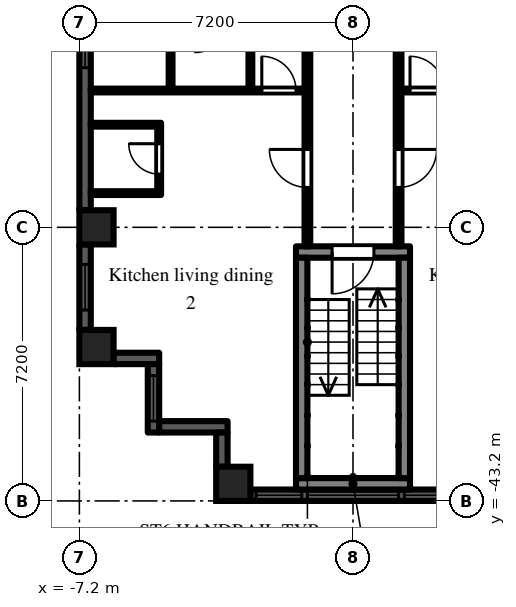
"""IFC4 building model, lengths in metres.
Left out: names, types, materials, properties, quantities, classifications, styles, units other than length and angle.
Written with IfcOpenShell. Run it as: python <this file> out.ifc"""

import sys

from ifc_helpers import new_model, si_unit, direction, frame, frame_2d, origin, origin_2d, place, context, subcontext, project, spatial, rectangle, extrude, element, fill, save


model = new_model("IFC4")
c1 = context("Model", 3, precision=1e-05, world=origin(), true_north=direction((0.0, 1.0)))
c2 = subcontext(c1, "Body", "Model", "MODEL_VIEW")
j1 = project(units=[si_unit("LENGTHUNIT", "METRE"), si_unit("PLANEANGLEUNIT", "RADIAN")], contexts=[c1])
p1 = place(None, origin())
s1 = spatial("IfcSite", under=j1, at=p1, CompositionType="ELEMENT")
p2 = place(p1, origin())
s2 = spatial("IfcBuilding", under=s1, at=p2, CompositionType="ELEMENT")
p3 = place(p2, frame((0.0, 0.0, 69.9)))
s3 = spatial("IfcBuildingStorey", under=s2, at=p3, CompositionType="ELEMENT", Elevation=69.9)
for number, where, z_axis, x_axis in (
    (1, (-6.75, -39.15, 0.0), (0.0, 0.0, 1.0), (1.0, 0.0, 0.0)),
    (2, (-6.75, -36.0, 0.0), (0.0, 0.0, 1.0), (1.0, 0.0, 0.0)),
    (3, (-3.15, -42.75, 0.0), (0.0, 0.0, 1.0), (1.0, 0.0, 0.0)),
):
    element("IfcColumn", number, at=place(p3, frame(where, z_axis=z_axis, x_axis=x_axis)), inside=s3, PredefinedType="COLUMN", context=c2, shape_type="SweptSolid", body=[
        extrude(rectangle(XDim=0.9, YDim=0.9, at=origin_2d()), origin(), (0.0, 0.0, 1.0), 3.0),
    ])
p4 = place(p3, frame((-7.05, -29.25, 0.0), z_axis=(0.0, 0.0, 1.0), x_axis=(0.0, -1.0, 0.0)))
e4 = element("IfcWall", 4, at=p4, inside=s3, PredefinedType="SOLIDWALL", context=c2, shape_type="SweptSolid", body=[
    extrude(rectangle(XDim=6.3, YDim=0.3, at=frame_2d((3.15, 0.0))), origin(), (0.0, 0.0, 1.0), 2.1),
])
p5 = place(p4, frame((0.15, 0.0, 0.2)))
e5 = element("IfcOpeningElement", 5, at=p5, cuts=e4, PredefinedType="OPENING", context=c2, shape_type="SweptSolid", body=[
    extrude(rectangle(XDim=2.4, YDim=1.85, at=frame_2d((1.2, 0.925))), frame((0.0, 0.16, 0.0), z_axis=(0.0, -1.0, 0.0), x_axis=(1.0, 0.0, 0.0)), (0.0, 0.0, 1.0), 0.32),
])
p6 = place(p3, frame((-7.05, -36.45, 0.0), z_axis=(0.0, 0.0, 1.0), x_axis=(0.0, -1.0, 0.0)))
e6 = element("IfcWall", 6, at=p6, inside=s3, PredefinedType="SOLIDWALL", context=c2, shape_type="SweptSolid", body=[
    extrude(rectangle(XDim=2.25, YDim=0.3, at=frame_2d((1.125, 0.0))), origin(), (0.0, 0.0, 1.0), 2.1),
])
p7 = place(p6, frame((0.525, 0.0, 0.2)))
e7 = element("IfcOpeningElement", 7, at=p7, cuts=e6, PredefinedType="OPENING", context=c2, shape_type="SweptSolid", body=[
    extrude(rectangle(XDim=1.2, YDim=1.85, at=frame_2d((0.6, 0.925))), frame((0.0, 0.16, 0.0), z_axis=(0.0, -1.0, 0.0), x_axis=(1.0, 0.0, 0.0)), (0.0, 0.0, 1.0), 0.32),
])
p8 = place(p3, frame((-6.3, -39.45, 0.0), z_axis=(0.0, 0.0, 1.0), x_axis=(1.0, 0.0, 0.0)))
e8 = element("IfcWall", 8, at=p8, inside=s3, PredefinedType="SOLIDWALL", context=c2, shape_type="SweptSolid", body=[
    extrude(rectangle(XDim=1.2, YDim=0.3, at=frame_2d((0.6, 0.0))), origin(), (0.0, 0.0, 1.0), 2.575),
])
p9 = place(p3, frame((-5.25, -39.6, 0.0), z_axis=(0.0, 0.0, 1.0), x_axis=(0.0, -1.0, 0.0)))
e9 = element("IfcWall", 9, at=p9, inside=s3, PredefinedType="SOLIDWALL", context=c2, shape_type="SweptSolid", body=[
    extrude(rectangle(XDim=1.8, YDim=0.3, at=frame_2d((0.9, 0.0))), origin(), (0.0, 0.0, 1.0), 2.575),
])
p10 = place(p9, frame((0.3, 0.0, 0.2)))
e10 = element("IfcOpeningElement", 10, at=p10, cuts=e9, PredefinedType="OPENING", context=c2, shape_type="SweptSolid", body=[
    extrude(rectangle(XDim=1.2, YDim=1.85, at=frame_2d((0.6, 0.925))), frame((0.0, 0.16, 0.0), z_axis=(0.0, -1.0, 0.0), x_axis=(1.0, 0.0, 0.0)), (0.0, 0.0, 1.0), 0.32),
])
p11 = place(p3, frame((-5.1, -41.25, 0.0), z_axis=(0.0, 0.0, 1.0), x_axis=(1.0, 0.0, 0.0)))
e11 = element("IfcWall", 11, at=p11, inside=s3, PredefinedType="SOLIDWALL", context=c2, shape_type="SweptSolid", body=[
    extrude(rectangle(XDim=1.8, YDim=0.3, at=frame_2d((0.9, 0.0))), origin(), (0.0, 0.0, 1.0), 2.575),
])
p12 = place(p3, frame((-3.45, -41.4, 0.0), z_axis=(0.0, 0.0, 1.0), x_axis=(0.0, -1.0, 0.0)))
e12 = element("IfcWall", 12, at=p12, inside=s3, PredefinedType="SOLIDWALL", context=c2, shape_type="SweptSolid", body=[
    extrude(rectangle(XDim=0.9, YDim=0.3, at=frame_2d((0.45, 0.0))), origin(), (0.0, 0.0, 1.0), 2.575),
])
p13 = place(p3, frame((-2.7, -43.05, 0.0), z_axis=(0.0, 0.0, 1.0), x_axis=(1.0, 0.0, 0.0)))
e13 = element("IfcWall", 13, at=p13, inside=s3, PredefinedType="SOLIDWALL", context=c2, shape_type="SweptSolid", body=[
    extrude(rectangle(XDim=5.4, YDim=0.3, at=frame_2d((2.7, 0.0))), origin(), (0.0, 0.0, 1.0), 2.1),
])
p14 = place(p13, frame((1.5, 0.0, 0.2)))
e14 = element("IfcOpeningElement", 14, at=p14, cuts=e13, PredefinedType="OPENING", context=c2, shape_type="SweptSolid", body=[
    extrude(rectangle(XDim=2.4, YDim=1.85, at=frame_2d((1.2, 0.925))), frame((0.0, 0.16, 0.0), z_axis=(0.0, -1.0, 0.0), x_axis=(1.0, 0.0, 0.0)), (0.0, 0.0, 1.0), 0.32),
])
p15 = place(p13, frame((0.15, 0.0, 0.2)))
e15 = element("IfcOpeningElement", 15, at=p15, cuts=e13, PredefinedType="OPENING", context=c2, shape_type="SweptSolid", body=[
    extrude(rectangle(XDim=1.2, YDim=1.85, at=frame_2d((0.6, 0.925))), frame((0.0, 0.16, 0.0), z_axis=(0.0, -1.0, 0.0), x_axis=(1.0, 0.0, 0.0)), (0.0, 0.0, 1.0), 0.32),
])
p16 = place(p13, frame((4.05, 0.0, 0.2)))
e16 = element("IfcOpeningElement", 16, at=p16, cuts=e13, PredefinedType="OPENING", context=c2, shape_type="SweptSolid", body=[
    extrude(rectangle(XDim=1.2, YDim=1.85, at=frame_2d((0.6, 0.925))), frame((0.0, 0.16, 0.0), z_axis=(0.0, -1.0, 0.0), x_axis=(1.0, 0.0, 0.0)), (0.0, 0.0, 1.0), 0.32),
])
p17 = place(p3, frame((-1.5, -36.65, 0.0), z_axis=(0.0, 0.0, 1.0), x_axis=(1.0, 0.0, 0.0)))
e17 = element("IfcWall", 17, at=p17, inside=s3, PredefinedType="SHEAR", context=c2, shape_type="SweptSolid", body=[
    extrude(rectangle(XDim=3.0, YDim=0.3, at=frame_2d((1.5, 0.0))), origin(), (0.0, 0.0, 1.0), 2.575),
])
p18 = place(p17, frame((0.95, 0.0, 0.0)))
e18 = element("IfcOpeningElement", 18, at=p18, cuts=e17, PredefinedType="OPENING", context=c2, shape_type="SweptSolid", body=[
    extrude(rectangle(XDim=1.1, YDim=2.1, at=frame_2d((0.55, 1.05))), frame((0.0, 0.16, 0.0), z_axis=(0.0, -1.0, 0.0), x_axis=(1.0, 0.0, 0.0)), (0.0, 0.0, 1.0), 0.32),
])
p19 = place(p3, frame((-1.5, -42.75, 0.0), z_axis=(0.0, 0.0, 1.0), x_axis=(1.0, 0.0, 0.0)))
e19 = element("IfcWall", 19, at=p19, inside=s3, PredefinedType="SHEAR", context=c2, shape_type="SweptSolid", body=[
    extrude(rectangle(XDim=3.0, YDim=0.3, at=frame_2d((1.5, 0.0))), origin(), (0.0, 0.0, 1.0), 2.575),
])
for number, where, z_axis, x_axis in (
    (20, (-1.35, -36.8, 0.0), (0.0, 0.0, 1.0), (0.0, -1.0, 0.0)),
    (21, (1.35, -36.8, 0.0), (0.0, 0.0, 1.0), (0.0, -1.0, 0.0)),
):
    element("IfcWall", number, at=place(p3, frame(where, z_axis=z_axis, x_axis=x_axis)), inside=s3, PredefinedType="SHEAR", context=c2, shape_type="SweptSolid", body=[
        extrude(rectangle(XDim=5.8, YDim=0.3, at=frame_2d((2.9, 0.0))), origin(), (0.0, 0.0, 1.0), 2.575),
    ])
for number, where, z_axis, x_axis in (
    (22, (-6.9, -35.1, 0.0), (0.0, 0.0, 1.0), (1.0, 0.0, 0.0)),
    (23, (-6.9, -33.3, 0.0), (0.0, 0.0, 1.0), (1.0, 0.0, 0.0)),
):
    element("IfcWall", number, at=place(p3, frame(where, z_axis=z_axis, x_axis=x_axis)), inside=s3, PredefinedType="PARTITIONING", context=c2, shape_type="SweptSolid", body=[
        extrude(rectangle(XDim=1.85, YDim=0.1, at=frame_2d((0.925, 0.0))), origin(), (0.0, 0.0, 1.0), 2.575),
    ])
p20 = place(p3, frame((-6.9, -32.4, 0.0), z_axis=(0.0, 0.0, 1.0), x_axis=(1.0, 0.0, 0.0)))
e24 = element("IfcWall", 24, at=p20, inside=s3, PredefinedType="PARTITIONING", context=c2, shape_type="SweptSolid", body=[
    extrude(rectangle(XDim=5.625, YDim=0.1, at=frame_2d((2.812, 0.0))), origin(), (0.0, 0.0, 1.0), 2.575),
])
p21 = place(p20, frame((4.5, 0.0, 0.0)))
e25 = element("IfcOpeningElement", 25, at=p21, cuts=e24, PredefinedType="OPENING", context=c2, shape_type="SweptSolid", body=[
    extrude(rectangle(XDim=0.9, YDim=2.1, at=frame_2d((0.45, 1.05))), frame((0.0, 0.06, 0.0), z_axis=(0.0, -1.0, 0.0), x_axis=(1.0, 0.0, 0.0)), (0.0, 0.0, 1.0), 0.12),
])
p22 = place(p3, frame((-5.1, -35.05, 0.0), z_axis=(0.0, 0.0, 1.0), x_axis=(0.0, 1.0, 0.0)))
e26 = element("IfcWall", 26, at=p22, inside=s3, PredefinedType="PARTITIONING", context=c2, shape_type="SweptSolid", body=[
    extrude(rectangle(XDim=1.7, YDim=0.1, at=frame_2d((0.85, 0.0))), origin(), (0.0, 0.0, 1.0), 2.575),
])
p23 = place(p22, frame((0.45, 0.0, 0.0)))
e27 = element("IfcOpeningElement", 27, at=p23, cuts=e26, PredefinedType="OPENING", context=c2, shape_type="SweptSolid", body=[
    extrude(rectangle(XDim=0.8, YDim=2.1, at=frame_2d((0.4, 1.05))), frame((0.0, 0.06, 0.0), z_axis=(0.0, -1.0, 0.0), x_axis=(1.0, 0.0, 0.0)), (0.0, 0.0, 1.0), 0.12),
])
p24 = place(p3, frame((-4.8, -32.35, 0.0), z_axis=(0.0, 0.0, 1.0), x_axis=(0.0, 1.0, 0.0)))
e28 = element("IfcWall", 28, at=p24, inside=s3, PredefinedType="PARTITIONING", context=c2, shape_type="SweptSolid", body=[
    extrude(rectangle(XDim=1.8, YDim=0.1, at=frame_2d((0.9, 0.0))), origin(), (0.0, 0.0, 1.0), 2.575),
])
p25 = place(p3, frame((-2.7, -32.35, 0.0), z_axis=(0.0, 0.0, 1.0), x_axis=(0.0, 1.0, 0.0)))
e29 = element("IfcWall", 29, at=p25, inside=s3, PredefinedType="PARTITIONING", context=c2, shape_type="SweptSolid", body=[
    extrude(rectangle(XDim=17.888, YDim=0.1, at=frame_2d((8.944, 0.0))), origin(), (0.0, 0.0, 1.0), 2.575),
])
p26 = place(p25, frame((2.2, 0.0, 0.0)))
e30 = element("IfcOpeningElement", 30, at=p26, cuts=e29, PredefinedType="OPENING", context=c2, shape_type="SweptSolid", body=[
    extrude(rectangle(XDim=0.9, YDim=2.1, at=frame_2d((0.45, 1.05))), frame((0.0, 0.06, 0.0), z_axis=(0.0, -1.0, 0.0), x_axis=(1.0, 0.0, 0.0)), (0.0, 0.0, 1.0), 0.12),
])
p27 = place(p25, frame((4.0, 0.0, 0.0)))
e31 = element("IfcOpeningElement", 31, at=p27, cuts=e29, PredefinedType="OPENING", context=c2, shape_type="SweptSolid", body=[
    extrude(rectangle(XDim=0.9, YDim=2.1, at=frame_2d((0.45, 1.05))), frame((0.0, 0.06, 0.0), z_axis=(0.0, -1.0, 0.0), x_axis=(1.0, 0.0, 0.0)), (0.0, 0.0, 1.0), 0.12),
])
p28 = place(p25, frame((9.4, 0.0, 0.0)))
e32 = element("IfcOpeningElement", 32, at=p28, cuts=e29, PredefinedType="OPENING", context=c2, shape_type="SweptSolid", body=[
    extrude(rectangle(XDim=0.9, YDim=2.1, at=frame_2d((0.45, 1.05))), frame((0.0, 0.06, 0.0), z_axis=(0.0, -1.0, 0.0), x_axis=(1.0, 0.0, 0.0)), (0.0, 0.0, 1.0), 0.12),
])
p29 = place(p25, frame((11.2, 0.0, 0.0)))
e33 = element("IfcOpeningElement", 33, at=p29, cuts=e29, PredefinedType="OPENING", context=c2, shape_type="SweptSolid", body=[
    extrude(rectangle(XDim=0.9, YDim=2.1, at=frame_2d((0.45, 1.05))), frame((0.0, 0.06, 0.0), z_axis=(0.0, -1.0, 0.0), x_axis=(1.0, 0.0, 0.0)), (0.0, 0.0, 1.0), 0.12),
])
p30 = place(p25, frame((14.8, 0.0, 0.0)))
e34 = element("IfcOpeningElement", 34, at=p30, cuts=e29, PredefinedType="OPENING", context=c2, shape_type="SweptSolid", body=[
    extrude(rectangle(XDim=0.9, YDim=2.1, at=frame_2d((0.45, 1.05))), frame((0.0, 0.06, 0.0), z_axis=(0.0, -1.0, 0.0), x_axis=(1.0, 0.0, 0.0)), (0.0, 0.0, 1.0), 0.12),
])
p31 = place(p3, frame((-1.2, -36.5, 0.0), z_axis=(0.0, 0.0, 1.0), x_axis=(0.0, 1.0, 0.0)))
e35 = element("IfcWall", 35, at=p31, inside=s3, PredefinedType="PARTITIONING", context=c2, shape_type="SweptSolid", body=[
    extrude(rectangle(XDim=35.225, YDim=0.15, at=frame_2d((17.613, 0.0))), origin(), (0.0, 0.0, 1.0), 2.575),
])
p32 = place(p31, frame((31.85, 0.0, 0.0)))
e36 = element("IfcOpeningElement", 36, at=p32, cuts=e35, PredefinedType="OPENING", context=c2, shape_type="SweptSolid", body=[
    extrude(rectangle(XDim=0.9, YDim=2.1, at=frame_2d((0.45, 1.05))), frame((0.0, 0.085, 0.0), z_axis=(0.0, -1.0, 0.0), x_axis=(1.0, 0.0, 0.0)), (0.0, 0.0, 1.0), 0.17),
])
p33 = place(p31, frame((23.05, 0.0, 0.0)))
e37 = element("IfcOpeningElement", 37, at=p33, cuts=e35, PredefinedType="OPENING", context=c2, shape_type="SweptSolid", body=[
    extrude(rectangle(XDim=0.9, YDim=2.1, at=frame_2d((0.45, 1.05))), frame((0.0, 0.085, 0.0), z_axis=(0.0, -1.0, 0.0), x_axis=(1.0, 0.0, 0.0)), (0.0, 0.0, 1.0), 0.17),
])
p34 = place(p31, frame((26.65, 0.0, 0.0)))
e38 = element("IfcOpeningElement", 38, at=p34, cuts=e35, PredefinedType="OPENING", context=c2, shape_type="SweptSolid", body=[
    extrude(rectangle(XDim=0.9, YDim=2.1, at=frame_2d((0.45, 1.05))), frame((0.0, 0.085, 0.0), z_axis=(0.0, -1.0, 0.0), x_axis=(1.0, 0.0, 0.0)), (0.0, 0.0, 1.0), 0.17),
])
p35 = place(p31, frame((1.55, 0.0, 0.0)))
e39 = element("IfcOpeningElement", 39, at=p35, cuts=e35, PredefinedType="OPENING", context=c2, shape_type="SweptSolid", body=[
    extrude(rectangle(XDim=1.0, YDim=2.1, at=frame_2d((0.5, 1.05))), frame((0.0, 0.085, 0.0), z_axis=(0.0, -1.0, 0.0), x_axis=(1.0, 0.0, 0.0)), (0.0, 0.0, 1.0), 0.17),
])
p36 = place(p3, frame((1.2, -36.5, 0.0), z_axis=(0.0, 0.0, 1.0), x_axis=(0.0, 1.0, 0.0)))
e40 = element("IfcWall", 40, at=p36, inside=s3, PredefinedType="PARTITIONING", context=c2, shape_type="SweptSolid", body=[
    extrude(rectangle(XDim=35.375, YDim=0.15, at=frame_2d((17.688, 0.0))), origin(), (0.0, 0.0, 1.0), 2.575),
])
p37 = place(p36, frame((31.85, 0.0, 0.0)))
e41 = element("IfcOpeningElement", 41, at=p37, cuts=e40, PredefinedType="OPENING", context=c2, shape_type="SweptSolid", body=[
    extrude(rectangle(XDim=0.9, YDim=2.1, at=frame_2d((0.45, 1.05))), frame((0.0, 0.085, 0.0), z_axis=(0.0, -1.0, 0.0), x_axis=(1.0, 0.0, 0.0)), (0.0, 0.0, 1.0), 0.17),
])
p38 = place(p36, frame((23.05, 0.0, 0.0)))
e42 = element("IfcOpeningElement", 42, at=p38, cuts=e40, PredefinedType="OPENING", context=c2, shape_type="SweptSolid", body=[
    extrude(rectangle(XDim=0.9, YDim=2.1, at=frame_2d((0.45, 1.05))), frame((0.0, 0.085, 0.0), z_axis=(0.0, -1.0, 0.0), x_axis=(1.0, 0.0, 0.0)), (0.0, 0.0, 1.0), 0.17),
])
p39 = place(p36, frame((26.65, 0.0, 0.0)))
e43 = element("IfcOpeningElement", 43, at=p39, cuts=e40, PredefinedType="OPENING", context=c2, shape_type="SweptSolid", body=[
    extrude(rectangle(XDim=0.9, YDim=2.1, at=frame_2d((0.45, 1.05))), frame((0.0, 0.085, 0.0), z_axis=(0.0, -1.0, 0.0), x_axis=(1.0, 0.0, 0.0)), (0.0, 0.0, 1.0), 0.17),
])
p40 = place(p36, frame((20.5, 0.0, 0.0)))
e44 = element("IfcOpeningElement", 44, at=p40, cuts=e40, PredefinedType="OPENING", context=c2, shape_type="SweptSolid", body=[
    extrude(rectangle(XDim=1.0, YDim=2.1, at=frame_2d((0.5, 1.05))), frame((0.0, 0.085, 0.0), z_axis=(0.0, -1.0, 0.0), x_axis=(1.0, 0.0, 0.0)), (0.0, 0.0, 1.0), 0.17),
])
p41 = place(p36, frame((1.55, 0.0, 0.0)))
e45 = element("IfcOpeningElement", 45, at=p41, cuts=e40, PredefinedType="OPENING", context=c2, shape_type="SweptSolid", body=[
    extrude(rectangle(XDim=1.0, YDim=2.1, at=frame_2d((0.5, 1.05))), frame((0.0, 0.085, 0.0), z_axis=(0.0, -1.0, 0.0), x_axis=(1.0, 0.0, 0.0)), (0.0, 0.0, 1.0), 0.17),
])
p42 = place(p3, frame((1.275, -32.4, 0.0), z_axis=(0.0, 0.0, 1.0), x_axis=(1.0, 0.0, 0.0)))
e46 = element("IfcWall", 46, at=p42, inside=s3, PredefinedType="PARTITIONING", context=c2, shape_type="SweptSolid", body=[
    extrude(rectangle(XDim=5.625, YDim=0.1, at=frame_2d((2.812, 0.0))), origin(), (0.0, 0.0, 1.0), 2.575),
])
p43 = place(p42, frame((0.225, 0.0, 0.0)))
e47 = element("IfcOpeningElement", 47, at=p43, cuts=e46, PredefinedType="OPENING", context=c2, shape_type="SweptSolid", body=[
    extrude(rectangle(XDim=0.9, YDim=2.1, at=frame_2d((0.45, 1.05))), frame((0.0, 0.06, 0.0), z_axis=(0.0, -1.0, 0.0), x_axis=(1.0, 0.0, 0.0)), (0.0, 0.0, 1.0), 0.12),
])
p44 = place(p5, origin())
e48 = element("IfcWindow", 48, at=p44, inside=s3, PartitioningType="SINGLE_PANEL", PredefinedType="WINDOW", context=c2, shape_type="SweptSolid", body=[
    extrude(rectangle(XDim=2.4, YDim=1.85, at=frame_2d((1.2, 0.925))), frame((0.0, 0.03, 0.0), z_axis=(0.0, -1.0, 0.0), x_axis=(1.0, 0.0, 0.0)), (0.0, 0.0, 1.0), 0.06),
])
fill(e5, e48)
p45 = place(p7, origin())
e49 = element("IfcWindow", 49, at=p45, inside=s3, PartitioningType="SINGLE_PANEL", PredefinedType="WINDOW", context=c2, shape_type="SweptSolid", body=[
    extrude(rectangle(XDim=1.2, YDim=1.85, at=frame_2d((0.6, 0.925))), frame((0.0, 0.03, 0.0), z_axis=(0.0, -1.0, 0.0), x_axis=(1.0, 0.0, 0.0)), (0.0, 0.0, 1.0), 0.06),
])
fill(e7, e49)
p46 = place(p10, origin())
e50 = element("IfcWindow", 50, at=p46, inside=s3, PartitioningType="SINGLE_PANEL", PredefinedType="WINDOW", context=c2, shape_type="SweptSolid", body=[
    extrude(rectangle(XDim=1.2, YDim=1.85, at=frame_2d((0.6, 0.925))), frame((0.0, 0.03, 0.0), z_axis=(0.0, -1.0, 0.0), x_axis=(1.0, 0.0, 0.0)), (0.0, 0.0, 1.0), 0.06),
])
fill(e10, e50)
p47 = place(p14, origin())
e51 = element("IfcWindow", 51, at=p47, inside=s3, PartitioningType="SINGLE_PANEL", PredefinedType="WINDOW", context=c2, shape_type="SweptSolid", body=[
    extrude(rectangle(XDim=2.4, YDim=1.85, at=frame_2d((1.2, 0.925))), frame((0.0, 0.03, 0.0), z_axis=(0.0, -1.0, 0.0), x_axis=(1.0, 0.0, 0.0)), (0.0, 0.0, 1.0), 0.06),
])
fill(e14, e51)
p48 = place(p15, origin())
e52 = element("IfcWindow", 52, at=p48, inside=s3, PartitioningType="SINGLE_PANEL", PredefinedType="WINDOW", context=c2, shape_type="SweptSolid", body=[
    extrude(rectangle(XDim=1.2, YDim=1.85, at=frame_2d((0.6, 0.925))), frame((0.0, 0.03, 0.0), z_axis=(0.0, -1.0, 0.0), x_axis=(1.0, 0.0, 0.0)), (0.0, 0.0, 1.0), 0.06),
])
fill(e15, e52)
p49 = place(p16, origin())
e53 = element("IfcWindow", 53, at=p49, inside=s3, PartitioningType="SINGLE_PANEL", PredefinedType="WINDOW", context=c2, shape_type="SweptSolid", body=[
    extrude(rectangle(XDim=1.2, YDim=1.85, at=frame_2d((0.6, 0.925))), frame((0.0, 0.03, 0.0), z_axis=(0.0, -1.0, 0.0), x_axis=(1.0, 0.0, 0.0)), (0.0, 0.0, 1.0), 0.06),
])
fill(e16, e53)
p50 = place(p18, frame((1.1, 0.0, 0.0), z_axis=(0.0, 0.0, 1.0), x_axis=(-1.0, 0.0, 0.0)))
e54 = element("IfcDoor", 54, at=p50, inside=s3, OperationType="SINGLE_SWING_RIGHT", PredefinedType="DOOR", context=c2, shape_type="SweptSolid", body=[
    extrude(rectangle(XDim=1.1, YDim=2.1, at=frame_2d((0.55, 1.05))), frame((0.0, 0.025, 0.0), z_axis=(0.0, -1.0, 0.0), x_axis=(1.0, 0.0, 0.0)), (0.0, 0.0, 1.0), 0.05),
])
fill(e18, e54)
p51 = place(p41, frame((1.0, 0.0, 0.0), z_axis=(0.0, 0.0, 1.0), x_axis=(-1.0, 0.0, 0.0)))
e55 = element("IfcDoor", 55, at=p51, inside=s3, OperationType="SINGLE_SWING_LEFT", PredefinedType="DOOR", context=c2, shape_type="SweptSolid", body=[
    extrude(rectangle(XDim=1.0, YDim=2.1, at=frame_2d((0.5, 1.05))), frame((0.0, 0.025, 0.0), z_axis=(0.0, -1.0, 0.0), x_axis=(1.0, 0.0, 0.0)), (0.0, 0.0, 1.0), 0.05),
])
fill(e45, e55)
p52 = place(p43, origin())
e56 = element("IfcDoor", 56, at=p52, inside=s3, OperationType="SINGLE_SWING_LEFT", PredefinedType="DOOR", context=c2, shape_type="SweptSolid", body=[
    extrude(rectangle(XDim=0.9, YDim=2.1, at=frame_2d((0.45, 1.05))), frame((0.0, 0.025, 0.0), z_axis=(0.0, -1.0, 0.0), x_axis=(1.0, 0.0, 0.0)), (0.0, 0.0, 1.0), 0.05),
])
fill(e47, e56)
p53 = place(p23, origin())
e57 = element("IfcDoor", 57, at=p53, inside=s3, OperationType="SINGLE_SWING_RIGHT", PredefinedType="DOOR", context=c2, shape_type="SweptSolid", body=[
    extrude(rectangle(XDim=0.8, YDim=2.1, at=frame_2d((0.4, 1.05))), frame((0.0, 0.025, 0.0), z_axis=(0.0, -1.0, 0.0), x_axis=(1.0, 0.0, 0.0)), (0.0, 0.0, 1.0), 0.05),
])
fill(e27, e57)
p54 = place(p35, origin())
e58 = element("IfcDoor", 58, at=p54, inside=s3, OperationType="SINGLE_SWING_RIGHT", PredefinedType="DOOR", context=c2, shape_type="SweptSolid", body=[
    extrude(rectangle(XDim=1.0, YDim=2.1, at=frame_2d((0.5, 1.05))), frame((0.0, 0.025, 0.0), z_axis=(0.0, -1.0, 0.0), x_axis=(1.0, 0.0, 0.0)), (0.0, 0.0, 1.0), 0.05),
])
fill(e39, e58)
p55 = place(p21, origin())
e59 = element("IfcDoor", 59, at=p55, inside=s3, OperationType="SINGLE_SWING_LEFT", PredefinedType="DOOR", context=c2, shape_type="SweptSolid", body=[
    extrude(rectangle(XDim=0.9, YDim=2.1, at=frame_2d((0.45, 1.05))), frame((0.0, 0.025, 0.0), z_axis=(0.0, -1.0, 0.0), x_axis=(1.0, 0.0, 0.0)), (0.0, 0.0, 1.0), 0.05),
])
fill(e25, e59)
save(model, sys.argv[1])
